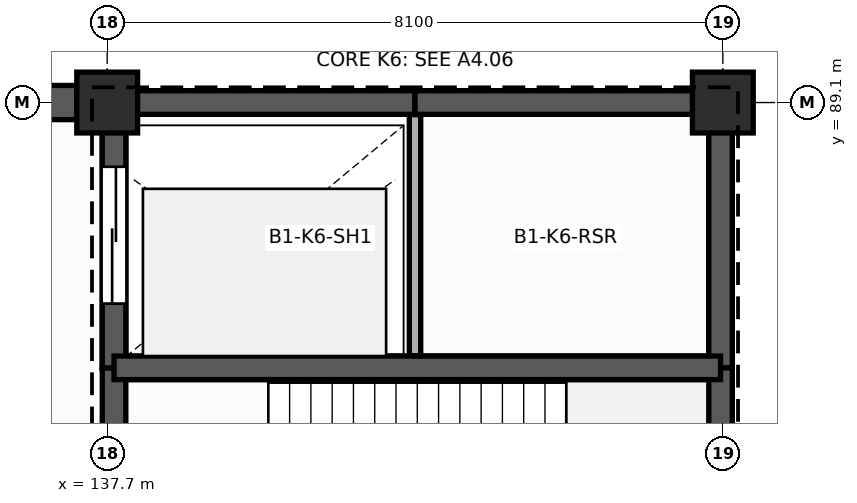
"""IFC4 building model, lengths in metres.
Left out: names, types, materials, properties, quantities, classifications, styles, units other than length and angle.
Written with IfcOpenShell. Run it as: python <this file> out.ifc"""

import sys

from ifc_helpers import new_model, si_unit, direction, frame, frame_2d, origin, origin_2d, place, context, subcontext, project, spatial, rectangle, extrude, element, fill, save


model = new_model("IFC4")
c1 = context("Model", 3, precision=1e-05, world=origin(), true_north=direction((0.0, 1.0)))
c2 = subcontext(c1, "Body", "Model", "MODEL_VIEW")
j1 = project(units=[si_unit("LENGTHUNIT", "METRE"), si_unit("PLANEANGLEUNIT", "RADIAN")], contexts=[c1])
p1 = place(None, origin())
s1 = spatial("IfcSite", under=j1, at=p1, CompositionType="ELEMENT")
p2 = place(p1, origin())
s2 = spatial("IfcBuilding", under=s1, at=p2, CompositionType="ELEMENT")
p3 = place(p2, frame((0.0, 0.0, -5.4)))
s3 = spatial("IfcBuildingStorey", under=s2, at=p3, CompositionType="ELEMENT", Elevation=-5.4)
for number, where, z_axis, x_axis in (
    (1, (137.7, 89.1, -0.4), (0.0, 0.0, 1.0), (1.0, 0.0, 0.0)),
    (2, (145.8, 89.1, -0.4), (0.0, 0.0, 1.0), (1.0, 0.0, 0.0)),
):
    element("IfcColumn", number, at=place(p3, frame(where, z_axis=z_axis, x_axis=x_axis)), inside=s3, PredefinedType="COLUMN", context=c2, shape_type="SweptSolid", body=[
        extrude(rectangle(XDim=0.8, YDim=0.8, at=origin_2d()), origin(), (0.0, 0.0, 1.0), 5.8),
    ])
p4 = place(p3, frame((137.3, 89.1, 0.0), z_axis=(0.0, 0.0, 1.0), x_axis=(-1.0, 0.0, 0.0)))
e3 = element("IfcWall", 3, at=p4, inside=s3, PredefinedType="USERDEFINED", context=c2, shape_type="SweptSolid", body=[
    extrude(rectangle(XDim=5.3, YDim=0.45, at=frame_2d((2.65, 0.0))), origin(), (0.0, 0.0, 1.0), 5.1),
])
p5 = place(p3, frame((137.79, 85.61, -1.35), z_axis=(0.0, 0.0, 1.0), x_axis=(1.0, 0.0, 0.0)))
e4 = element("IfcWall", 4, at=p5, inside=s3, PredefinedType="SHEAR", context=c2, shape_type="SweptSolid", body=[
    extrude(rectangle(XDim=7.98, YDim=0.31, at=frame_2d((3.99, 0.0))), origin(), (0.0, 0.0, 1.0), 0.95),
])
p6 = place(p3, frame((145.77, 85.61, -1.35), z_axis=(0.0, 0.0, 1.0), x_axis=(0.0, 1.0, 0.0)))
e5 = element("IfcWall", 5, at=p6, inside=s3, PredefinedType="SHEAR", context=c2, shape_type="SweptSolid", body=[
    extrude(rectangle(XDim=3.49, YDim=0.31, at=frame_2d((1.745, 0.0))), origin(), (0.0, 0.0, 1.0), 0.95),
])
p7 = place(p3, frame((145.77, 89.1, -1.35), z_axis=(0.0, 0.0, 1.0), x_axis=(-1.0, 0.0, 0.0)))
e6 = element("IfcWall", 6, at=p7, inside=s3, PredefinedType="SHEAR", context=c2, shape_type="SweptSolid", body=[
    extrude(rectangle(XDim=7.98, YDim=0.31, at=frame_2d((3.99, 0.0))), origin(), (0.0, 0.0, 1.0), 0.95),
])
p8 = place(p3, frame((137.79, 89.1, -1.35), z_axis=(0.0, 0.0, 1.0), x_axis=(0.0, -1.0, 0.0)))
e7 = element("IfcWall", 7, at=p8, inside=s3, PredefinedType="SHEAR", context=c2, shape_type="SweptSolid", body=[
    extrude(rectangle(XDim=3.49, YDim=0.31, at=frame_2d((1.745, 0.0))), origin(), (0.0, 0.0, 1.0), 0.95),
])
p9 = place(p3, frame((137.79, 81.25, -0.4), z_axis=(0.0, 0.0, 1.0), x_axis=(0.0, 1.0, 0.0)))
e8 = element("IfcWall", 8, at=p9, inside=s3, PredefinedType="SHEAR", context=c2, shape_type="SweptSolid", body=[
    extrude(rectangle(XDim=4.36, YDim=0.31, at=frame_2d((2.18, 0.0))), origin(), (0.0, 0.0, 1.0), 5.8),
])
p10 = place(p9, frame((1.35, 0.0, 0.4)))
e9 = element("IfcOpeningElement", 9, at=p10, cuts=e8, PredefinedType="OPENING", context=c2, shape_type="SweptSolid", body=[
    extrude(rectangle(XDim=1.2, YDim=2.25, at=frame_2d((0.6, 1.125))), frame((0.0, 0.165, 0.0), z_axis=(0.0, -1.0, 0.0), x_axis=(1.0, 0.0, 0.0)), (0.0, 0.0, 1.0), 0.33),
])
p11 = place(p3, frame((137.79, 85.61, -0.4), z_axis=(0.0, 0.0, 1.0), x_axis=(0.0, 1.0, 0.0)))
e10 = element("IfcWall", 10, at=p11, inside=s3, PredefinedType="SHEAR", context=c2, shape_type="SweptSolid", body=[
    extrude(rectangle(XDim=3.49, YDim=0.31, at=frame_2d((1.745, 0.0))), origin(), (0.0, 0.0, 1.0), 5.8),
])
p12 = place(p11, frame((0.845, 0.0, 0.4)))
e11 = element("IfcOpeningElement", 11, at=p12, cuts=e10, PredefinedType="OPENING", context=c2, shape_type="SweptSolid", body=[
    extrude(rectangle(XDim=1.8, YDim=2.4, at=frame_2d((0.9, 1.2))), frame((0.0, 0.165, 0.0), z_axis=(0.0, -1.0, 0.0), x_axis=(1.0, 0.0, 0.0)), (0.0, 0.0, 1.0), 0.33),
])
p13 = place(p3, frame((137.79, 89.1, -0.4), z_axis=(0.0, 0.0, 1.0), x_axis=(1.0, 0.0, 0.0)))
e12 = element("IfcWall", 12, at=p13, inside=s3, PredefinedType="SHEAR", context=c2, shape_type="SweptSolid", body=[
    extrude(rectangle(XDim=3.96, YDim=0.31, at=frame_2d((1.98, 0.0))), origin(), (0.0, 0.0, 1.0), 5.8),
])
p14 = place(p3, frame((141.75, 89.1, -0.4), z_axis=(0.0, 0.0, 1.0), x_axis=(1.0, 0.0, 0.0)))
e13 = element("IfcWall", 13, at=p14, inside=s3, PredefinedType="SHEAR", context=c2, shape_type="SweptSolid", body=[
    extrude(rectangle(XDim=4.02, YDim=0.31, at=frame_2d((2.01, 0.0))), origin(), (0.0, 0.0, 1.0), 5.8),
])
p15 = place(p3, frame((145.77, 89.1, -0.4), z_axis=(0.0, 0.0, 1.0), x_axis=(0.0, -1.0, 0.0)))
e14 = element("IfcWall", 14, at=p15, inside=s3, PredefinedType="SHEAR", context=c2, shape_type="SweptSolid", body=[
    extrude(rectangle(XDim=3.49, YDim=0.31, at=frame_2d((1.745, 0.0))), origin(), (0.0, 0.0, 1.0), 5.8),
])
p16 = place(p3, frame((145.77, 85.61, -0.4), z_axis=(0.0, 0.0, 1.0), x_axis=(0.0, -1.0, 0.0)))
e15 = element("IfcWall", 15, at=p16, inside=s3, PredefinedType="SHEAR", context=c2, shape_type="SweptSolid", body=[
    extrude(rectangle(XDim=4.36, YDim=0.31, at=frame_2d((2.18, 0.0))), origin(), (0.0, 0.0, 1.0), 5.8),
])
p17 = place(p3, frame((137.79, 85.61, -0.4), z_axis=(0.0, 0.0, 1.0), x_axis=(1.0, 0.0, 0.0)))
e16 = element("IfcWall", 16, at=p17, inside=s3, PredefinedType="SHEAR", context=c2, shape_type="SweptSolid", body=[
    extrude(rectangle(XDim=7.98, YDim=0.31, at=frame_2d((3.99, 0.0))), origin(), (0.0, 0.0, 1.0), 5.8),
])
p18 = place(p3, frame((141.75, 85.77, 0.0), z_axis=(0.0, 0.0, 1.0), x_axis=(0.0, 1.0, 0.0)))
e17 = element("IfcWall", 17, at=p18, inside=s3, PredefinedType="PLUMBINGWALL", context=c2, shape_type="SweptSolid", body=[
    extrude(rectangle(XDim=3.17, YDim=0.15, at=frame_2d((1.585, 0.0))), origin(), (0.0, 0.0, 1.0), 5.05),
])
p19 = place(p12, origin())
e18 = element("IfcDoor", 18, at=p19, inside=s3, OperationType="SLIDING_TO_LEFT", PredefinedType="DOOR", context=c2, shape_type="SweptSolid", body=[
    extrude(rectangle(XDim=1.8, YDim=2.4, at=frame_2d((0.9, 1.2))), frame((0.0, 0.025, 0.0), z_axis=(0.0, -1.0, 0.0), x_axis=(1.0, 0.0, 0.0)), (0.0, 0.0, 1.0), 0.05),
])
fill(e11, e18)
save(model, sys.argv[1])
